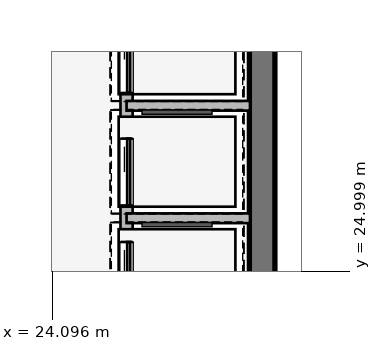
"""IFC4 building model, lengths in metres.
Left out: names, types, materials, properties, quantities, classifications, styles, units other than length and angle.
Written with IfcOpenShell. Run it as: python <this file> out.ifc"""

import sys

from ifc_helpers import new_model, si_unit, direction, frame, frame_2d, origin, place, context, subcontext, project, spatial, rectangle, extrude, element, fill, save


model = new_model("IFC4")
c1 = context("Model", 3, precision=1e-05, world=origin(), true_north=direction((0.0, 1.0)))
c2 = subcontext(c1, "Body", "Model", "MODEL_VIEW")
j1 = project(units=[si_unit("LENGTHUNIT", "METRE"), si_unit("PLANEANGLEUNIT", "RADIAN")], contexts=[c1])
p1 = place(None, origin())
s1 = spatial("IfcSite", under=j1, at=p1, CompositionType="ELEMENT")
p2 = place(p1, origin())
s2 = spatial("IfcBuilding", under=s1, at=p2, CompositionType="ELEMENT")
p3 = place(p2, frame((0.0, 0.0, 177.45)))
s3 = spatial("IfcBuildingStorey", under=s2, at=p3, CompositionType="ELEMENT", Elevation=177.45)
p4 = place(p3, frame((27.55, 29.55, 0.0), z_axis=(0.0, 0.0, 1.0), x_axis=(0.0, -1.0, 0.0)))
e1 = element("IfcWall", 1, at=p4, inside=s3, PredefinedType="SHEAR", context=c2, shape_type="SweptSolid", body=[
    extrude(rectangle(XDim=11.25, YDim=0.42, at=frame_2d((5.625, 0.0))), origin(), (0.0, 0.0, 1.0), 3.45),
])
p5 = place(p3, frame((25.32, 29.55, 0.0), z_axis=(0.0, 0.0, 1.0), x_axis=(0.0, -1.0, 0.0)))
e2 = element("IfcWall", 2, at=p5, inside=s3, PredefinedType="PARTITIONING", context=c2, shape_type="SweptSolid", body=[
    extrude(rectangle(XDim=5.53, YDim=0.2, at=frame_2d((2.765, 0.0))), origin(), (0.0, 0.0, 1.0), 3.16),
])
p6 = place(p5, frame((0.52, 0.0, 0.0)))
e3 = element("IfcOpeningElement", 3, at=p6, cuts=e2, PredefinedType="OPENING", context=c2, shape_type="SweptSolid", body=[
    extrude(rectangle(XDim=1.1, YDim=2.2, at=frame_2d((0.55, 1.1))), frame((0.0, 0.11, 0.0), z_axis=(0.0, -1.0, 0.0), x_axis=(1.0, 0.0, 0.0)), (0.0, 0.0, 1.0), 0.22),
])
p7 = place(p5, frame((2.37, 0.0, 0.0)))
e4 = element("IfcOpeningElement", 4, at=p7, cuts=e2, PredefinedType="OPENING", context=c2, shape_type="SweptSolid", body=[
    extrude(rectangle(XDim=1.1, YDim=2.2, at=frame_2d((0.55, 1.1))), frame((0.0, 0.11, 0.0), z_axis=(0.0, -1.0, 0.0), x_axis=(1.0, 0.0, 0.0)), (0.0, 0.0, 1.0), 0.22),
])
p8 = place(p5, frame((4.07, 0.0, 0.0)))
e5 = element("IfcOpeningElement", 5, at=p8, cuts=e2, PredefinedType="OPENING", context=c2, shape_type="SweptSolid", body=[
    extrude(rectangle(XDim=1.1, YDim=2.2, at=frame_2d((0.55, 1.1))), frame((0.0, 0.11, 0.0), z_axis=(0.0, -1.0, 0.0), x_axis=(1.0, 0.0, 0.0)), (0.0, 0.0, 1.0), 0.22),
])
for number, where, z_axis, x_axis in (
    (6, (25.32, 25.87, 0.0), (0.0, 0.0, 1.0), (1.0, 0.0, 0.0)),
    (7, (25.32, 27.72, 0.0), (0.0, 0.0, 1.0), (1.0, 0.0, 0.0)),
):
    element("IfcWall", number, at=place(p3, frame(where, z_axis=z_axis, x_axis=x_axis)), inside=s3, PredefinedType="PARTITIONING", context=c2, shape_type="SweptSolid", body=[
        extrude(rectangle(XDim=2.03, YDim=0.16, at=frame_2d((1.015, 0.0))), origin(), (0.0, 0.0, 1.0), 3.16),
    ])
p9 = place(p6, origin())
e8 = element("IfcDoor", 8, at=p9, inside=s3, OperationType="SLIDING_TO_LEFT", PredefinedType="DOOR", context=c2, shape_type="SweptSolid", body=[
    extrude(rectangle(XDim=1.1, YDim=2.2, at=frame_2d((0.55, 1.1))), frame((0.0, 0.025, 0.0), z_axis=(0.0, -1.0, 0.0), x_axis=(1.0, 0.0, 0.0)), (0.0, 0.0, 1.0), 0.05),
])
fill(e3, e8)
p10 = place(p7, origin())
e9 = element("IfcDoor", 9, at=p10, inside=s3, OperationType="SLIDING_TO_LEFT", PredefinedType="DOOR", context=c2, shape_type="SweptSolid", body=[
    extrude(rectangle(XDim=1.1, YDim=2.2, at=frame_2d((0.55, 1.1))), frame((0.0, 0.025, 0.0), z_axis=(0.0, -1.0, 0.0), x_axis=(1.0, 0.0, 0.0)), (0.0, 0.0, 1.0), 0.05),
])
fill(e4, e9)
p11 = place(p8, origin())
e10 = element("IfcDoor", 10, at=p11, inside=s3, OperationType="SLIDING_TO_LEFT", PredefinedType="DOOR", context=c2, shape_type="SweptSolid", body=[
    extrude(rectangle(XDim=1.1, YDim=2.2, at=frame_2d((0.55, 1.1))), frame((0.0, 0.025, 0.0), z_axis=(0.0, -1.0, 0.0), x_axis=(1.0, 0.0, 0.0)), (0.0, 0.0, 1.0), 0.05),
])
fill(e5, e10)
save(model, sys.argv[1])
